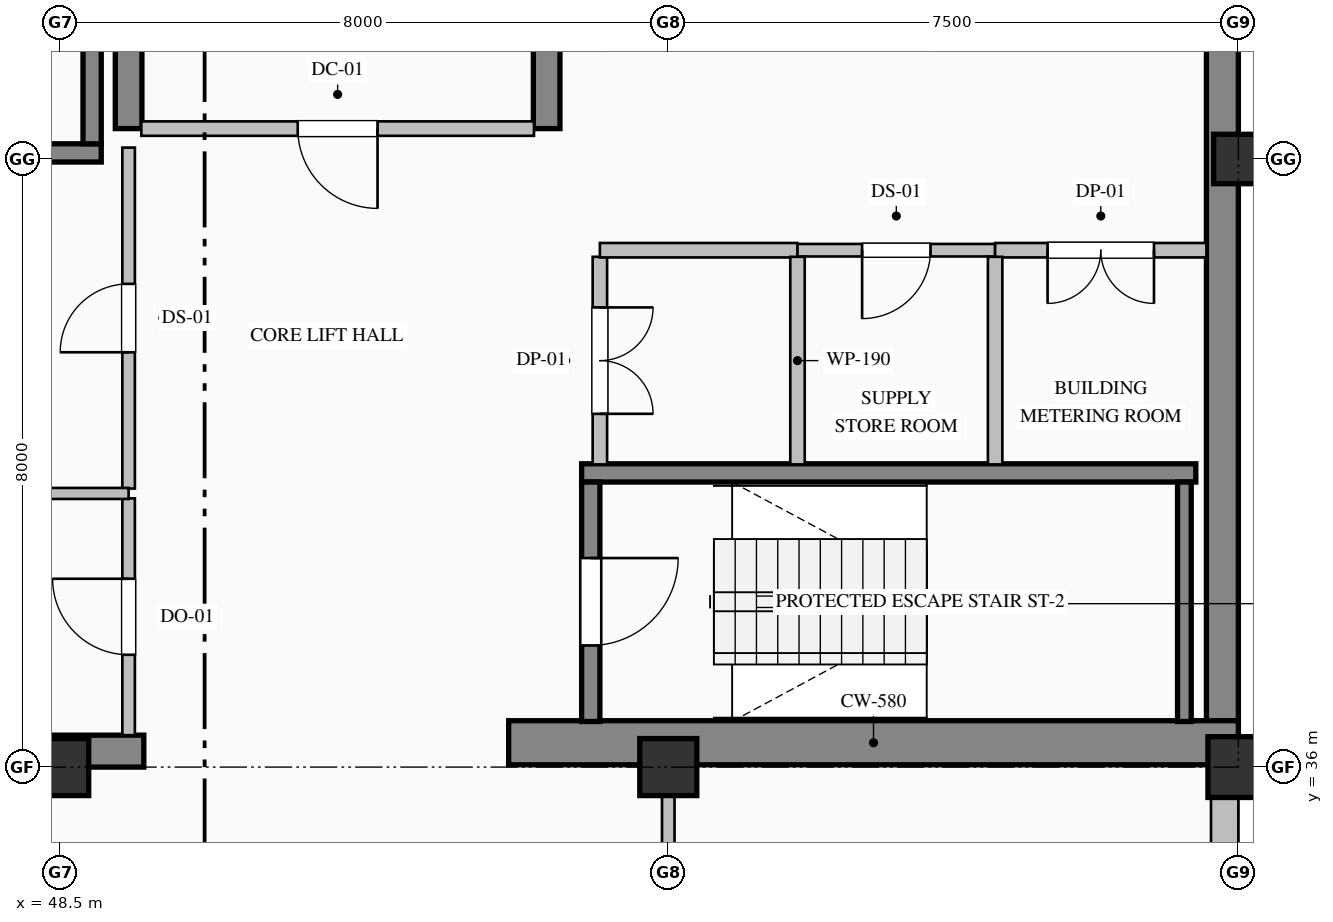
"""IFC4 building model, lengths in metres.
Left out: names, types, materials, properties, quantities, classifications, styles, units other than length and angle.
Written with IfcOpenShell. Run it as: python <this file> out.ifc"""

import sys

from ifc_helpers import new_model, si_unit, direction, frame, frame_2d, origin, origin_2d, place, context, subcontext, project, spatial, rectangle, hollow_rectangle, extrude, element, fill, save


model = new_model("IFC4")
c1 = context("Model", 3, precision=1e-05, world=origin(), true_north=direction((0.0, 1.0)))
c2 = subcontext(c1, "Body", "Model", "MODEL_VIEW")
j1 = project(units=[si_unit("LENGTHUNIT", "METRE"), si_unit("PLANEANGLEUNIT", "RADIAN")], contexts=[c1])
p1 = place(None, origin())
s1 = spatial("IfcSite", under=j1, at=p1, CompositionType="ELEMENT")
p2 = place(p1, origin())
s2 = spatial("IfcBuilding", under=s1, at=p2, CompositionType="ELEMENT")
p3 = place(p2, frame((0.0, 0.0, 307.2)))
s3 = spatial("IfcBuildingStorey", under=s2, at=p3, CompositionType="ELEMENT", Elevation=307.2)
p4 = place(p3, frame((63.79, 36.32, 0.0), z_axis=(0.0, 0.0, 1.0), x_axis=(0.0, 1.0, 0.0)))
e1 = element("IfcWall", 1, at=p4, inside=s3, PredefinedType="SHEAR", context=c2, shape_type="SweptSolid", body=[
    extrude(rectangle(XDim=15.26, YDim=0.42, at=frame_2d((7.63, 0.0))), origin(), (0.0, 0.0, 1.0), 3.785),
])
p5 = place(p3, frame((40.5, 36.21, 0.0), z_axis=(0.0, 0.0, 1.0), x_axis=(1.0, 0.0, 0.0)))
e2 = element("IfcWall", 2, at=p5, inside=s3, PredefinedType="SHEAR", context=c2, shape_type="SweptSolid", body=[
    extrude(rectangle(XDim=9.1, YDim=0.42, at=frame_2d((4.55, 0.0))), origin(), (0.0, 0.0, 1.0), 3.785),
])
p6 = place(p3, frame((54.4, 36.32, 0.0), z_axis=(0.0, 0.0, 1.0), x_axis=(1.0, 0.0, 0.0)))
e3 = element("IfcWall", 3, at=p6, inside=s3, PredefinedType="SHEAR", context=c2, shape_type="SweptSolid", body=[
    extrude(rectangle(XDim=9.6, YDim=0.58, at=frame_2d((4.8, 0.0))), origin(), (0.0, 0.0, 1.0), 4.0),
])
p7 = place(p3, frame((49.4, 44.4, 0.0), z_axis=(0.0, 0.0, 1.0), x_axis=(0.0, 1.0, 0.0)))
e4 = element("IfcWall", 4, at=p7, inside=s3, PredefinedType="SHEAR", context=c2, shape_type="SweptSolid", body=[
    extrude(rectangle(XDim=3.0, YDim=0.35, at=frame_2d((1.5, 0.0))), origin(), (0.0, 0.0, 1.0), 3.785),
])
p8 = place(p3, frame((54.9, 44.4, 0.0), z_axis=(0.0, 0.0, 1.0), x_axis=(0.0, 1.0, 0.0)))
e5 = element("IfcWall", 5, at=p8, inside=s3, PredefinedType="SHEAR", context=c2, shape_type="SweptSolid", body=[
    extrude(rectangle(XDim=7.18, YDim=0.35, at=frame_2d((3.59, 0.0))), origin(), (0.0, 0.0, 1.0), 3.785),
])
for number, where, z_axis, x_axis in (
    (6, (48.5, 36.0, 0.0), (0.0, 0.0, 1.0), (1.0, 0.0, 0.0)),
    (7, (56.5, 36.0, 0.0), (0.0, 0.0, 1.0), (1.0, 0.0, 0.0)),
):
    element("IfcColumn", number, at=place(p3, frame(where, z_axis=z_axis, x_axis=x_axis)), inside=s3, PredefinedType="COLUMN", context=c2, shape_type="SweptSolid", body=[
        extrude(rectangle(XDim=0.75, YDim=0.75, at=origin_2d()), origin(), (0.0, 0.0, 1.0), 4.0),
    ])
p9 = place(p3, frame((64.0, 36.0, 0.0), z_axis=(0.0, 0.0, 1.0), x_axis=(1.0, 0.0, 0.0)))
e8 = element("IfcColumn", 8, at=p9, inside=s3, PredefinedType="COLUMN", context=c2, shape_type="SweptSolid", body=[
    extrude(hollow_rectangle(XDim=0.8, YDim=0.8, WallThickness=0.032, at=origin_2d()), origin(), (0.0, 0.0, 1.0), 4.0),
])
p10 = place(p3, frame((64.0, 44.0, 0.0), z_axis=(0.0, 0.0, 1.0), x_axis=(1.0, 0.0, 0.0)))
e9 = element("IfcColumn", 9, at=p10, inside=s3, PredefinedType="COLUMN", context=c2, shape_type="SweptSolid", body=[
    extrude(hollow_rectangle(XDim=0.65, YDim=0.65, WallThickness=0.028, at=origin_2d()), origin(), (0.0, 0.0, 1.0), 4.0),
])
p11 = place(p3, frame((63.82, 36.05, 0.0), z_axis=(0.0, 0.0, 1.0), x_axis=(0.0, -1.0, 0.0)))
e10 = element("IfcWall", 10, at=p11, inside=s3, PredefinedType="SOLIDWALL", context=c2, shape_type="SweptSolid", body=[
    extrude(rectangle(XDim=13.55, YDim=0.36, at=frame_2d((6.775, 0.0))), origin(), (0.0, 0.0, 1.0), 3.335),
])
p12 = place(p11, frame((2.925, 0.0, 0.9)))
e11 = element("IfcOpeningElement", 11, at=p12, cuts=e10, PredefinedType="OPENING", context=c2, shape_type="SweptSolid", body=[
    extrude(rectangle(XDim=1.35, YDim=1.85, at=frame_2d((0.675, 0.925))), frame((0.0, 0.19, 0.0), z_axis=(0.0, -1.0, 0.0), x_axis=(1.0, 0.0, 0.0)), (0.0, 0.0, 1.0), 0.38),
])
p13 = place(p3, frame((49.04, 44.08, 0.0), z_axis=(0.0, 0.0, 1.0), x_axis=(-1.0, 0.0, 0.0)))
e12 = element("IfcWall", 12, at=p13, inside=s3, PredefinedType="SOLIDWALL", context=c2, shape_type="SweptSolid", body=[
    extrude(rectangle(XDim=8.08, YDim=0.24, at=frame_2d((4.04, 0.0))), origin(), (0.0, 0.0, 1.0), 4.0),
])
p14 = place(p3, frame((48.92, 44.2, 0.0), z_axis=(0.0, 0.0, 1.0), x_axis=(0.0, 1.0, 0.0)))
e13 = element("IfcWall", 13, at=p14, inside=s3, PredefinedType="SOLIDWALL", context=c2, shape_type="SweptSolid", body=[
    extrude(rectangle(XDim=3.15, YDim=0.24, at=frame_2d((1.575, 0.0))), origin(), (0.0, 0.0, 1.0), 4.0),
])
p15 = place(p3, frame((55.36, 39.87, 0.0), z_axis=(0.0, 0.0, 1.0), x_axis=(1.0, 0.0, 0.0)))
e14 = element("IfcWall", 14, at=p15, inside=s3, PredefinedType="SOLIDWALL", context=c2, shape_type="SweptSolid", body=[
    extrude(rectangle(XDim=8.08, YDim=0.24, at=frame_2d((4.04, 0.0))), origin(), (0.0, 0.0, 1.0), 4.0),
])
p16 = place(p3, frame((55.48, 39.75, 0.0), z_axis=(0.0, 0.0, 1.0), x_axis=(0.0, -1.0, 0.0)))
e15 = element("IfcWall", 15, at=p16, inside=s3, PredefinedType="SOLIDWALL", context=c2, shape_type="SweptSolid", body=[
    extrude(rectangle(XDim=3.15, YDim=0.24, at=frame_2d((1.575, 0.0))), origin(), (0.0, 0.0, 1.0), 4.0),
])
p17 = place(p16, frame((1.0, 0.0, 0.0)))
e16 = element("IfcOpeningElement", 16, at=p17, cuts=e15, PredefinedType="OPENING", context=c2, shape_type="SweptSolid", body=[
    extrude(rectangle(XDim=1.15, YDim=2.2, at=frame_2d((0.575, 1.1))), frame((0.0, 0.13, 0.0), z_axis=(0.0, -1.0, 0.0), x_axis=(1.0, 0.0, 0.0)), (0.0, 0.0, 1.0), 0.26),
])
p18 = place(p3, frame((63.29, 36.6, 0.0), z_axis=(0.0, 0.0, 1.0), x_axis=(0.0, 1.0, 0.0)))
e17 = element("IfcWall", 17, at=p18, inside=s3, PredefinedType="SOLIDWALL", context=c2, shape_type="SweptSolid", body=[
    extrude(rectangle(XDim=3.15, YDim=0.18, at=frame_2d((1.575, 0.0))), origin(), (0.0, 0.0, 1.0), 4.0),
])
p19 = place(p3, frame((54.733, 44.4, 0.0), z_axis=(0.0, 0.0, 1.0), x_axis=(-1.0, 0.0, 0.0)))
e18 = element("IfcWall", 18, at=p19, inside=s3, PredefinedType="PARTITIONING", context=c2, shape_type="SweptSolid", body=[
    extrude(rectangle(XDim=5.166, YDim=0.19, at=frame_2d((2.583, 0.0))), origin(), (0.0, 0.0, 1.0), 3.785),
])
p20 = place(p19, frame((2.058, 0.0, 0.0)))
e19 = element("IfcOpeningElement", 19, at=p20, cuts=e18, PredefinedType="OPENING", context=c2, shape_type="SweptSolid", body=[
    extrude(rectangle(XDim=1.05, YDim=2.15, at=frame_2d((0.525, 1.075))), frame((0.0, 0.105, 0.0), z_axis=(0.0, -1.0, 0.0), x_axis=(1.0, 0.0, 0.0)), (0.0, 0.0, 1.0), 0.21),
])
p21 = place(p3, frame((49.4, 36.42, 0.0), z_axis=(0.0, 0.0, 1.0), x_axis=(0.0, 1.0, 0.0)))
e20 = element("IfcWall", 20, at=p21, inside=s3, PredefinedType="PARTITIONING", context=c2, shape_type="SweptSolid", body=[
    extrude(rectangle(XDim=3.115, YDim=0.165, at=frame_2d((1.558, 0.0))), origin(), (0.0, 0.0, 1.0), 3.027),
])
p22 = place(p21, frame((1.058, 0.0, 0.0)))
e21 = element("IfcOpeningElement", 21, at=p22, cuts=e20, PredefinedType="OPENING", context=c2, shape_type="SweptSolid", body=[
    extrude(rectangle(XDim=1.0, YDim=2.15, at=frame_2d((0.5, 1.075))), frame((0.0, 0.093, 0.0), z_axis=(0.0, -1.0, 0.0), x_axis=(1.0, 0.0, 0.0)), (0.0, 0.0, 1.0), 0.185),
])
p23 = place(p3, frame((49.4, 39.665, 0.0), z_axis=(0.0, 0.0, 1.0), x_axis=(0.0, 1.0, 0.0)))
e22 = element("IfcWall", 22, at=p23, inside=s3, PredefinedType="PARTITIONING", context=c2, shape_type="SweptSolid", body=[
    extrude(rectangle(XDim=4.485, YDim=0.165, at=frame_2d((2.243, 0.0))), origin(), (0.0, 0.0, 1.0), 3.027),
])
p24 = place(p23, frame((1.793, 0.0, 0.0)))
e23 = element("IfcOpeningElement", 23, at=p24, cuts=e22, PredefinedType="OPENING", context=c2, shape_type="SweptSolid", body=[
    extrude(rectangle(XDim=0.9, YDim=2.15, at=frame_2d((0.45, 1.075))), frame((0.0, 0.093, 0.0), z_axis=(0.0, -1.0, 0.0), x_axis=(1.0, 0.0, 0.0)), (0.0, 0.0, 1.0), 0.185),
])
p25 = place(p3, frame((55.6, 42.713, 0.0), z_axis=(0.0, 0.0, 1.0), x_axis=(0.0, -1.0, 0.0)))
e24 = element("IfcWall", 24, at=p25, inside=s3, PredefinedType="PARTITIONING", context=c2, shape_type="SweptSolid", body=[
    extrude(rectangle(XDim=2.731, YDim=0.19, at=frame_2d((1.365, 0.0))), origin(), (0.0, 0.0, 1.0), 3.785),
])
p26 = place(p25, frame((0.666, 0.0, 0.0)))
e25 = element("IfcOpeningElement", 25, at=p26, cuts=e24, PredefinedType="OPENING", context=c2, shape_type="SweptSolid", body=[
    extrude(rectangle(XDim=1.4, YDim=2.25, at=frame_2d((0.7, 1.125))), frame((0.0, 0.105, 0.0), z_axis=(0.0, -1.0, 0.0), x_axis=(1.0, 0.0, 0.0)), (0.0, 0.0, 1.0), 0.21),
])
p27 = place(p3, frame((40.92, 39.6, 0.0), z_axis=(0.0, 0.0, 1.0), x_axis=(1.0, 0.0, 0.0)))
e26 = element("IfcWall", 26, at=p27, inside=s3, PredefinedType="PARTITIONING", context=c2, shape_type="SweptSolid", body=[
    extrude(rectangle(XDim=8.48, YDim=0.145, at=frame_2d((4.24, 0.0))), origin(), (0.0, 0.0, 1.0), 3.785),
])
p28 = place(p3, frame((58.2, 42.8, 0.0), z_axis=(0.0, 0.0, 1.0), x_axis=(-1.0, 0.0, 0.0)))
e27 = element("IfcWall", 27, at=p28, inside=s3, PredefinedType="PARTITIONING", context=c2, shape_type="SweptSolid", body=[
    extrude(rectangle(XDim=2.6, YDim=0.19, at=frame_2d((1.3, 0.0))), origin(), (0.0, 0.0, 1.0), 3.785),
])
p29 = place(p3, frame((60.8, 42.8, 0.0), z_axis=(0.0, 0.0, 1.0), x_axis=(-1.0, 0.0, 0.0)))
e28 = element("IfcWall", 28, at=p29, inside=s3, PredefinedType="PARTITIONING", context=c2, shape_type="SweptSolid", body=[
    extrude(rectangle(XDim=2.6, YDim=0.165, at=frame_2d((1.3, 0.0))), origin(), (0.0, 0.0, 1.0), 3.785),
])
p30 = place(p29, frame((0.85, 0.0, 0.0)))
e29 = element("IfcOpeningElement", 29, at=p30, cuts=e28, PredefinedType="OPENING", context=c2, shape_type="SweptSolid", body=[
    extrude(rectangle(XDim=0.9, YDim=2.15, at=frame_2d((0.45, 1.075))), frame((0.0, 0.093, 0.0), z_axis=(0.0, -1.0, 0.0), x_axis=(1.0, 0.0, 0.0)), (0.0, 0.0, 1.0), 0.185),
])
p31 = place(p3, frame((63.58, 42.8, 0.0), z_axis=(0.0, 0.0, 1.0), x_axis=(-1.0, 0.0, 0.0)))
e30 = element("IfcWall", 30, at=p31, inside=s3, PredefinedType="PARTITIONING", context=c2, shape_type="SweptSolid", body=[
    extrude(rectangle(XDim=2.78, YDim=0.19, at=frame_2d((1.39, 0.0))), origin(), (0.0, 0.0, 1.0), 3.785),
])
p32 = place(p31, frame((0.69, 0.0, 0.0)))
e31 = element("IfcOpeningElement", 31, at=p32, cuts=e30, PredefinedType="OPENING", context=c2, shape_type="SweptSolid", body=[
    extrude(rectangle(XDim=1.4, YDim=2.25, at=frame_2d((0.7, 1.125))), frame((0.0, 0.105, 0.0), z_axis=(0.0, -1.0, 0.0), x_axis=(1.0, 0.0, 0.0)), (0.0, 0.0, 1.0), 0.21),
])
for number, where, z_axis, x_axis in (
    (32, (58.2, 42.713, 0.0), (0.0, 0.0, 1.0), (0.0, -1.0, 0.0)),
    (33, (60.8, 42.713, 0.0), (0.0, 0.0, 1.0), (0.0, -1.0, 0.0)),
):
    element("IfcWall", number, at=place(p3, frame(where, z_axis=z_axis, x_axis=x_axis)), inside=s3, PredefinedType="PARTITIONING", context=c2, shape_type="SweptSolid", body=[
        extrude(rectangle(XDim=2.731, YDim=0.19, at=frame_2d((1.365, 0.0))), origin(), (0.0, 0.0, 1.0), 3.785),
    ])
p33 = place(p3, frame((56.5, 36.0, 0.0), z_axis=(0.0, 0.0, 1.0), x_axis=(0.0, -1.0, 0.0)))
e34 = element("IfcWall", 34, at=p33, inside=s3, PredefinedType="PARTITIONING", context=c2, shape_type="SweptSolid", body=[
    extrude(rectangle(XDim=2.325, YDim=0.165, at=frame_2d((1.163, 0.0))), origin(), (0.0, 0.0, 1.0), 3.177),
])
p34 = place(p17, origin())
e35 = element("IfcDoor", 35, at=p34, inside=s3, OperationType="SINGLE_SWING_LEFT", PredefinedType="DOOR", context=c2, shape_type="SweptSolid", body=[
    extrude(rectangle(XDim=1.15, YDim=2.2, at=frame_2d((0.575, 1.1))), frame((0.0, 0.025, 0.0), z_axis=(0.0, -1.0, 0.0), x_axis=(1.0, 0.0, 0.0)), (0.0, 0.0, 1.0), 0.05),
])
fill(e16, e35)
p35 = place(p20, origin())
e36 = element("IfcDoor", 36, at=p35, inside=s3, OperationType="SINGLE_SWING_LEFT", PredefinedType="DOOR", context=c2, shape_type="SweptSolid", body=[
    extrude(rectangle(XDim=1.05, YDim=2.15, at=frame_2d((0.525, 1.075))), frame((0.0, 0.025, 0.0), z_axis=(0.0, -1.0, 0.0), x_axis=(1.0, 0.0, 0.0)), (0.0, 0.0, 1.0), 0.05),
])
fill(e19, e36)
p36 = place(p22, origin())
e37 = element("IfcDoor", 37, at=p36, inside=s3, OperationType="SINGLE_SWING_RIGHT", PredefinedType="DOOR", context=c2, shape_type="SweptSolid", body=[
    extrude(rectangle(XDim=1.0, YDim=2.15, at=frame_2d((0.5, 1.075))), frame((0.0, 0.025, 0.0), z_axis=(0.0, -1.0, 0.0), x_axis=(1.0, 0.0, 0.0)), (0.0, 0.0, 1.0), 0.05),
])
fill(e21, e37)
p37 = place(p24, origin())
e38 = element("IfcDoor", 38, at=p37, inside=s3, OperationType="SINGLE_SWING_LEFT", PredefinedType="DOOR", context=c2, shape_type="SweptSolid", body=[
    extrude(rectangle(XDim=0.9, YDim=2.15, at=frame_2d((0.45, 1.075))), frame((0.0, 0.025, 0.0), z_axis=(0.0, -1.0, 0.0), x_axis=(1.0, 0.0, 0.0)), (0.0, 0.0, 1.0), 0.05),
])
fill(e23, e38)
p38 = place(p26, origin())
e39 = element("IfcDoor", 39, at=p38, inside=s3, OperationType="DOUBLE_DOOR_SINGLE_SWING", PredefinedType="DOOR", context=c2, shape_type="SweptSolid", body=[
    extrude(rectangle(XDim=1.4, YDim=2.25, at=frame_2d((0.7, 1.125))), frame((0.0, 0.025, 0.0), z_axis=(0.0, -1.0, 0.0), x_axis=(1.0, 0.0, 0.0)), (0.0, 0.0, 1.0), 0.05),
])
fill(e25, e39)
p39 = place(p30, origin())
e40 = element("IfcDoor", 40, at=p39, inside=s3, OperationType="SINGLE_SWING_RIGHT", PredefinedType="DOOR", context=c2, shape_type="SweptSolid", body=[
    extrude(rectangle(XDim=0.9, YDim=2.15, at=frame_2d((0.45, 1.075))), frame((0.0, 0.025, 0.0), z_axis=(0.0, -1.0, 0.0), x_axis=(1.0, 0.0, 0.0)), (0.0, 0.0, 1.0), 0.05),
])
fill(e29, e40)
p40 = place(p32, origin())
e41 = element("IfcDoor", 41, at=p40, inside=s3, OperationType="DOUBLE_DOOR_SINGLE_SWING", PredefinedType="DOOR", context=c2, shape_type="SweptSolid", body=[
    extrude(rectangle(XDim=1.4, YDim=2.25, at=frame_2d((0.7, 1.125))), frame((0.0, 0.025, 0.0), z_axis=(0.0, -1.0, 0.0), x_axis=(1.0, 0.0, 0.0)), (0.0, 0.0, 1.0), 0.05),
])
fill(e31, e41)
save(model, sys.argv[1])
